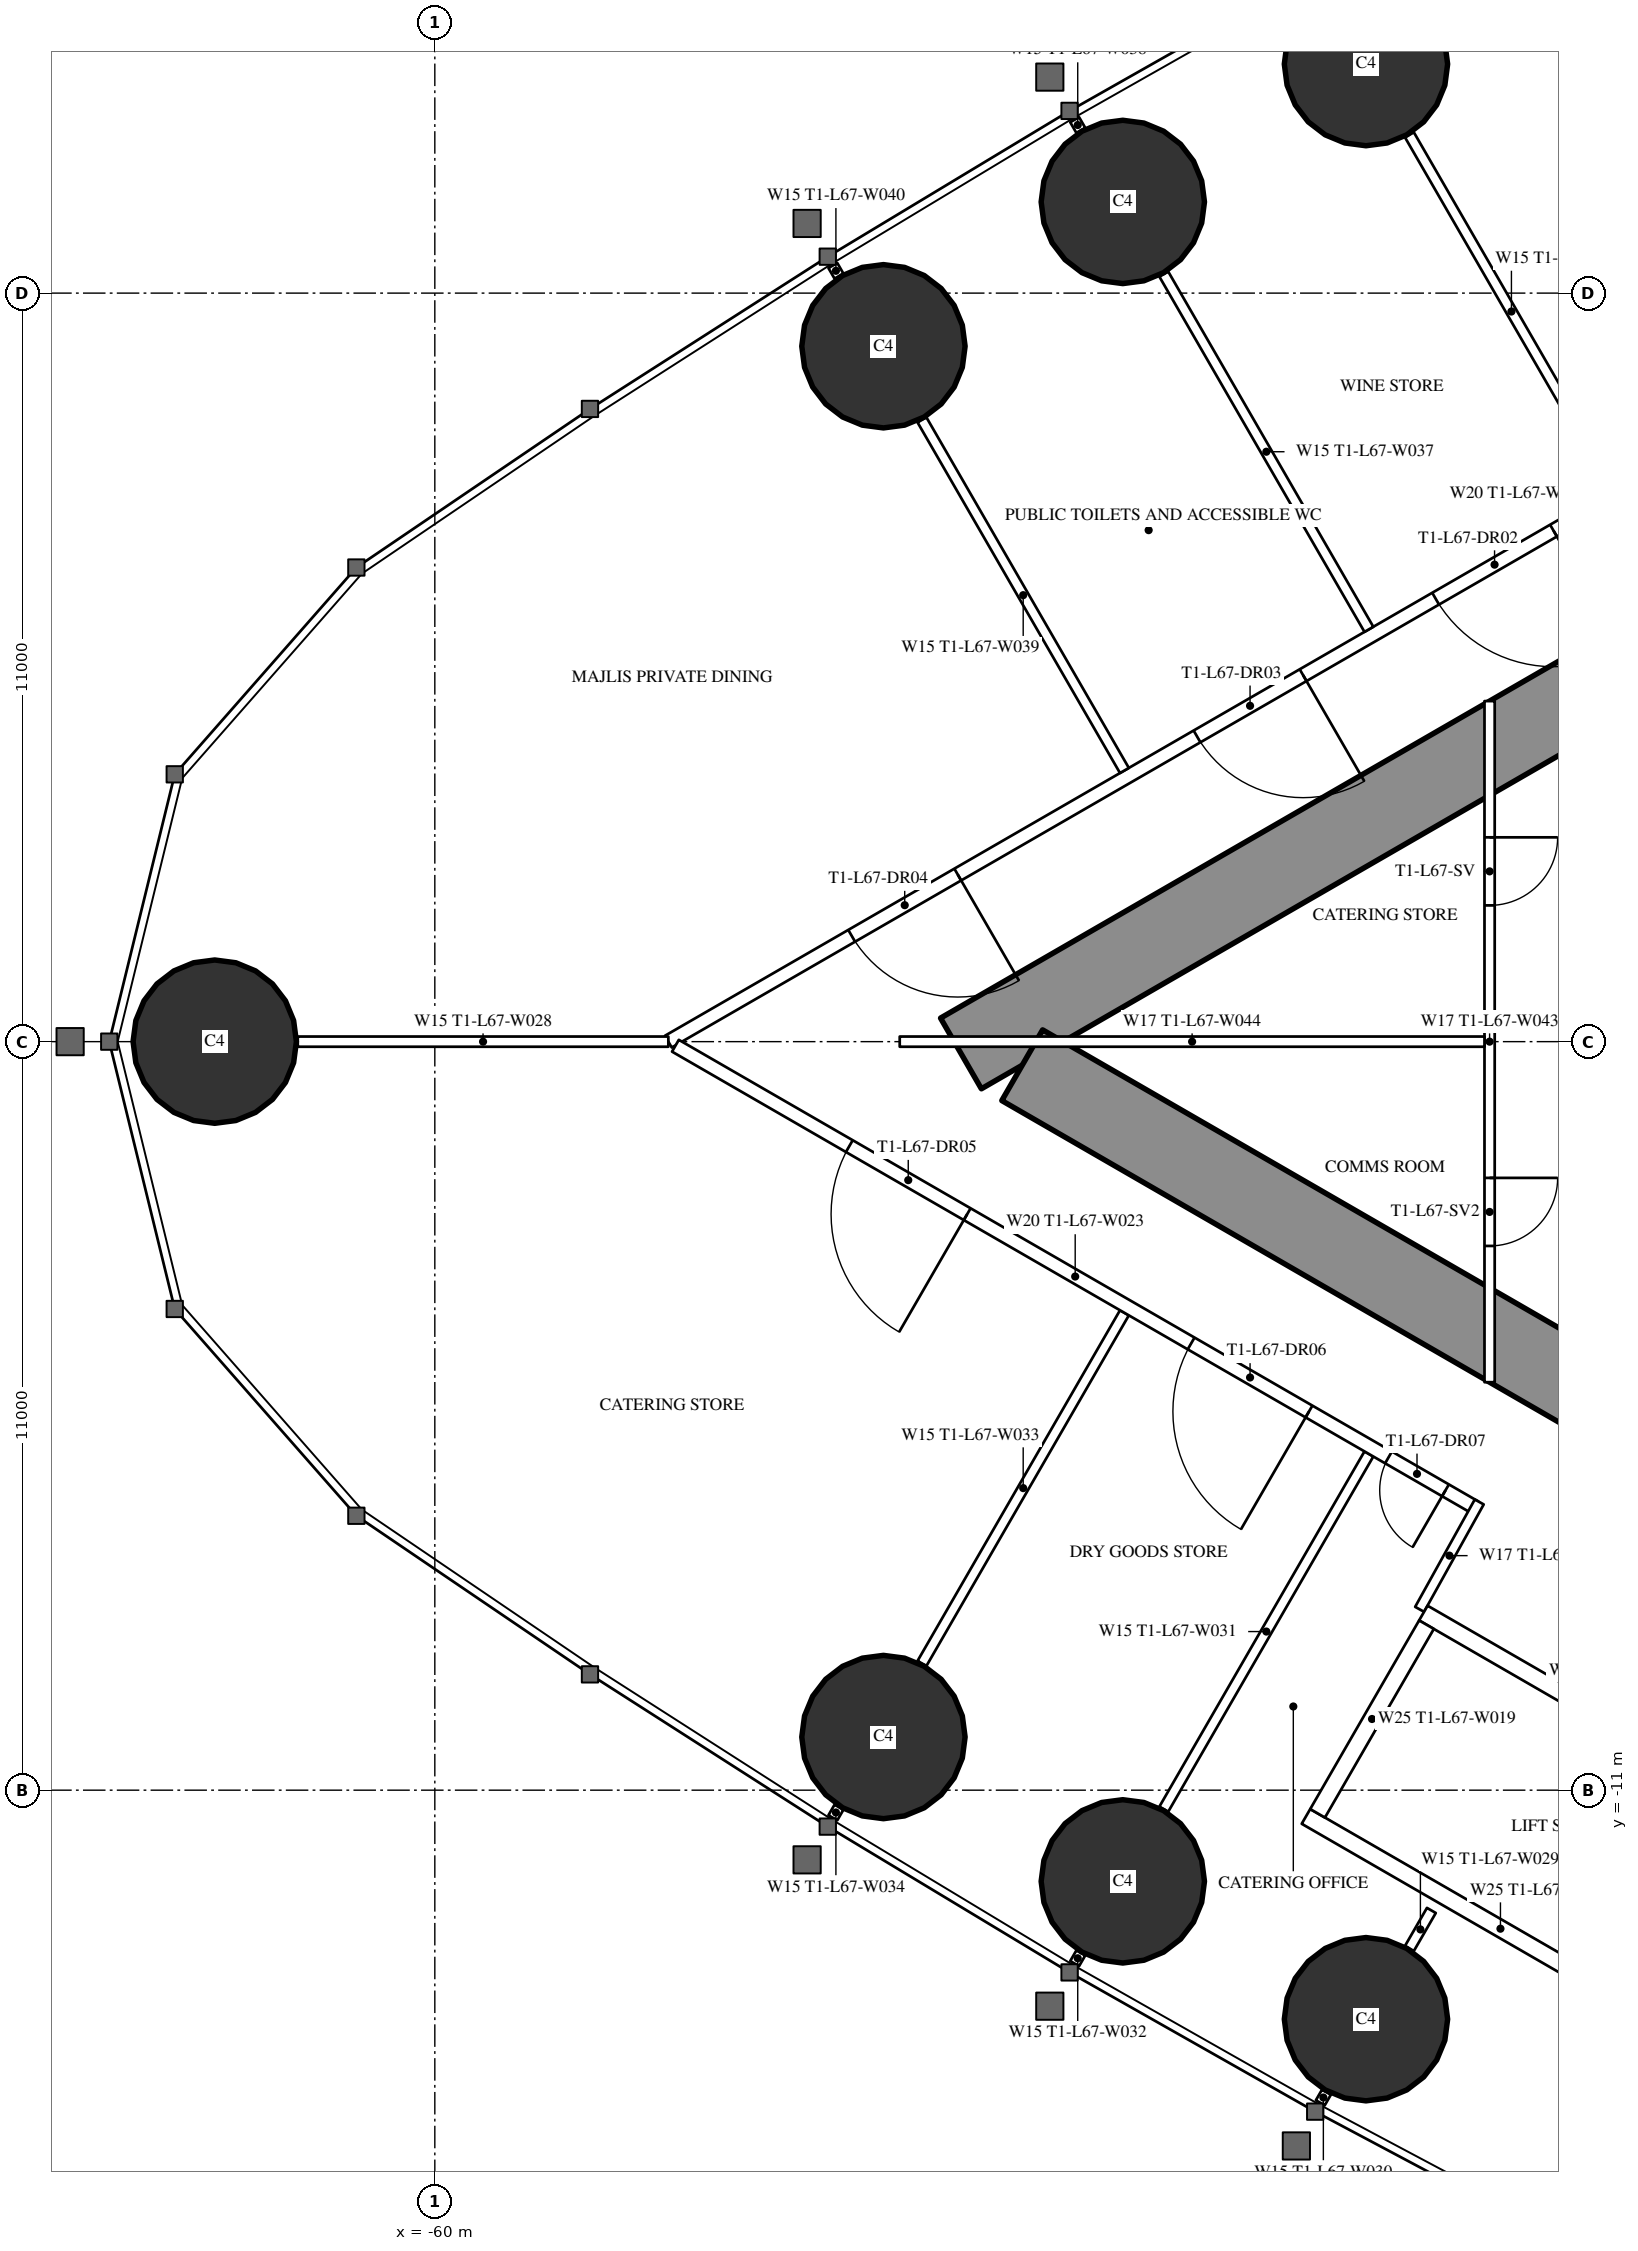
"""IFC4 building model, lengths in metres.
Left out: names, types, materials, properties, quantities, classifications, styles, units other than length and angle.
Written with IfcOpenShell. Run it as: python <this file> out.ifc"""

import sys

from ifc_helpers import new_model, si_unit, direction, frame, frame_2d, origin, origin_2d, place, context, subcontext, project, spatial, rectangle, circle, extrude, element, fill, save


model = new_model("IFC4")
c1 = context("Model", 3, precision=1e-05, world=origin(), true_north=direction((0.0, 1.0)))
c2 = subcontext(c1, "Body", "Model", "MODEL_VIEW")
j1 = project(units=[si_unit("LENGTHUNIT", "METRE"), si_unit("PLANEANGLEUNIT", "RADIAN")], contexts=[c1])
p1 = place(None, origin())
s1 = spatial("IfcSite", under=j1, at=p1, CompositionType="ELEMENT")
p2 = place(p1, origin())
s2 = spatial("IfcBuilding", under=s1, at=p2, CompositionType="ELEMENT")
p3 = place(p2, frame((0.0, 0.0, 251.9)))
s3 = spatial("IfcBuildingStorey", under=s2, at=p3, CompositionType="ELEMENT", Elevation=251.9)
for number, where, z_axis, x_axis in (
    (1, (-63.234, 0.0, 0.0), (0.0, 0.0, 1.0), (1.0, 0.0, 0.0)),
    (2, (-53.408, -10.219, 0.0), (0.0, 0.0, 1.0), (1.0, 0.0, 0.0)),
    (3, (-49.89, -12.34, 0.0), (0.0, 0.0, 1.0), (1.0, 0.0, 0.0)),
    (4, (-46.317, -14.365, 0.0), (0.0, 0.0, 1.0), (1.0, 0.0, 0.0)),
    (5, (-46.317, 14.365, 0.0), (0.0, 0.0, 1.0), (1.0, 0.0, 0.0)),
    (6, (-49.89, 12.34, 0.0), (0.0, 0.0, 1.0), (1.0, 0.0, 0.0)),
    (7, (-53.408, 10.219, 0.0), (0.0, 0.0, 1.0), (1.0, 0.0, 0.0)),
):
    element("IfcColumn", number, at=place(p3, frame(where, z_axis=z_axis, x_axis=x_axis)), inside=s3, PredefinedType="COLUMN", context=c2, shape_type="SweptSolid", body=[
        extrude(circle(Radius=1.2, at=origin_2d()), origin(), (0.0, 0.0, 1.0), 5.4),
    ])
p4 = place(p3, frame((-27.2, 14.3, 0.0), z_axis=(0.0, 0.0, 1.0), x_axis=(-0.866026593062, -0.499997940104, 0.0)))
e8 = element("IfcWall", 8, at=p4, inside=s3, PredefinedType="SHEAR", context=c2, shape_type="SweptSolid", body=[
    extrude(rectangle(XDim=28.946, YDim=1.2, at=frame_2d((14.473, 0.0))), origin(), (0.0, 0.0, 1.0), 5.4),
])
p5 = place(p4, frame((4.6, 0.0, 0.0)))
e9 = element("IfcOpeningElement", 9, at=p5, cuts=e8, PredefinedType="OPENING", context=c2, shape_type="SweptSolid", body=[
    extrude(rectangle(XDim=1.0, YDim=2.2, at=frame_2d((0.5, 1.1))), frame((0.0, 0.61, 0.0), z_axis=(0.0, -1.0, 0.0), x_axis=(1.0, 0.0, 0.0)), (0.0, 0.0, 1.0), 1.22),
])
p6 = place(p4, frame((13.395, 0.0, 0.0)))
e10 = element("IfcOpeningElement", 10, at=p6, cuts=e8, PredefinedType="OPENING", context=c2, shape_type="SweptSolid", body=[
    extrude(rectangle(XDim=1.8, YDim=2.2, at=frame_2d((0.9, 1.1))), frame((0.0, 0.61, 0.0), z_axis=(0.0, -1.0, 0.0), x_axis=(1.0, 0.0, 0.0)), (0.0, 0.0, 1.0), 1.22),
])
p7 = place(p3, frame((-27.2, -14.3, 0.0), z_axis=(0.0, 0.0, 1.0), x_axis=(-0.866024021859, 0.500002393557, 0.0)))
e11 = element("IfcWall", 11, at=p7, inside=s3, PredefinedType="SHEAR", context=c2, shape_type="SweptSolid", body=[
    extrude(rectangle(XDim=27.907, YDim=1.2, at=frame_2d((13.954, 0.0))), origin(), (0.0, 0.0, 1.0), 5.4),
])
p8 = place(p7, frame((4.6, 0.0, 0.0)))
e12 = element("IfcOpeningElement", 12, at=p8, cuts=e11, PredefinedType="OPENING", context=c2, shape_type="SweptSolid", body=[
    extrude(rectangle(XDim=1.0, YDim=2.2, at=frame_2d((0.5, 1.1))), frame((0.0, 0.61, 0.0), z_axis=(0.0, -1.0, 0.0), x_axis=(1.0, 0.0, 0.0)), (0.0, 0.0, 1.0), 1.22),
])
p9 = place(p7, frame((13.395, 0.0, 0.0)))
e13 = element("IfcOpeningElement", 13, at=p9, cuts=e11, PredefinedType="OPENING", context=c2, shape_type="SweptSolid", body=[
    extrude(rectangle(XDim=1.8, YDim=2.2, at=frame_2d((0.9, 1.1))), frame((0.0, 0.61, 0.0), z_axis=(0.0, -1.0, 0.0), x_axis=(1.0, 0.0, 0.0)), (0.0, 0.0, 1.0), 1.22),
])
p10 = place(p3, frame((-28.681, 16.101, 0.0), z_axis=(0.0, 0.0, 1.0), x_axis=(-0.866024860443, -0.500000941094, 0.0)))
e14 = element("IfcWall", 14, at=p10, inside=s3, PredefinedType="PARTITIONING", context=c2, shape_type="SweptSolid", body=[
    extrude(rectangle(XDim=32.201, YDim=0.2, at=frame_2d((16.101, 0.0))), origin(), (0.0, 0.0, 1.0), 5.15),
])
p11 = place(p10, frame((7.266, 0.0, 0.0)))
e15 = element("IfcOpeningElement", 15, at=p11, cuts=e14, PredefinedType="OPENING", context=c2, shape_type="SweptSolid", body=[
    extrude(rectangle(XDim=1.8, YDim=2.2, at=frame_2d((0.9, 1.1))), frame((0.0, 0.11, 0.0), z_axis=(0.0, -1.0, 0.0), x_axis=(1.0, 0.0, 0.0)), (0.0, 0.0, 1.0), 0.22),
])
p12 = place(p10, frame((17.182, 0.0, 0.0)))
e16 = element("IfcOpeningElement", 16, at=p12, cuts=e14, PredefinedType="OPENING", context=c2, shape_type="SweptSolid", body=[
    extrude(rectangle(XDim=2.0, YDim=2.4, at=frame_2d((1.0, 1.2))), frame((0.0, 0.11, 0.0), z_axis=(0.0, -1.0, 0.0), x_axis=(1.0, 0.0, 0.0)), (0.0, 0.0, 1.0), 0.22),
])
p13 = place(p10, frame((21.43, 0.0, 0.0)))
e17 = element("IfcOpeningElement", 17, at=p13, cuts=e14, PredefinedType="OPENING", context=c2, shape_type="SweptSolid", body=[
    extrude(rectangle(XDim=1.8, YDim=2.2, at=frame_2d((0.9, 1.1))), frame((0.0, 0.11, 0.0), z_axis=(0.0, -1.0, 0.0), x_axis=(1.0, 0.0, 0.0)), (0.0, 0.0, 1.0), 0.22),
])
p14 = place(p10, frame((27.29, 0.0, 0.0)))
e18 = element("IfcOpeningElement", 18, at=p14, cuts=e14, PredefinedType="OPENING", context=c2, shape_type="SweptSolid", body=[
    extrude(rectangle(XDim=1.8, YDim=2.2, at=frame_2d((0.9, 1.1))), frame((0.0, 0.11, 0.0), z_axis=(0.0, -1.0, 0.0), x_axis=(1.0, 0.0, 0.0)), (0.0, 0.0, 1.0), 0.22),
])
p15 = place(p3, frame((-42.68, 8.134, 0.0), z_axis=(0.0, 0.0, 1.0), x_axis=(-0.499984479505, 0.866034364361, 0.0)))
e19 = element("IfcWall", 19, at=p15, inside=s3, PredefinedType="PARTITIONING", context=c2, shape_type="SweptSolid", body=[
    extrude(rectangle(XDim=5.995, YDim=0.15, at=frame_2d((2.998, 0.0))), origin(), (0.0, 0.0, 1.0), 4.25),
])
p16 = place(p3, frame((-46.274, 6.059, 0.0), z_axis=(0.0, 0.0, 1.0), x_axis=(-0.500020471368, 0.866013584312, 0.0)))
e20 = element("IfcWall", 20, at=p16, inside=s3, PredefinedType="PARTITIONING", context=c2, shape_type="SweptSolid", body=[
    extrude(rectangle(XDim=6.028, YDim=0.15, at=frame_2d((3.014, 0.0))), origin(), (0.0, 0.0, 1.0), 4.25),
])
p17 = place(p3, frame((-50.508, 13.392, 0.0), z_axis=(0.0, 0.0, 1.0), x_axis=(-0.499644091975, 0.866230789891, 0.0)))
e21 = element("IfcWall", 21, at=p17, inside=s3, PredefinedType="PARTITIONING", context=c2, shape_type="SweptSolid", body=[
    extrude(rectangle(XDim=0.18, YDim=0.15, at=frame_2d((0.09, 0.0))), origin(), (0.0, 0.0, 1.0), 4.25),
])
p18 = place(p3, frame((-49.866, 3.985, 0.0), z_axis=(0.0, 0.0, 1.0), x_axis=(-0.500000694566, 0.866025002776, 0.0)))
e22 = element("IfcWall", 22, at=p18, inside=s3, PredefinedType="PARTITIONING", context=c2, shape_type="SweptSolid", body=[
    extrude(rectangle(XDim=5.95, YDim=0.15, at=frame_2d((2.975, 0.0))), origin(), (0.0, 0.0, 1.0), 4.25),
])
p19 = place(p3, frame((-54.061, 11.25, 0.0), z_axis=(0.0, 0.0, 1.0), x_axis=(-0.500391173478, 0.865799441849, 0.0)))
e23 = element("IfcWall", 23, at=p19, inside=s3, PredefinedType="PARTITIONING", context=c2, shape_type="SweptSolid", body=[
    extrude(rectangle(XDim=0.179, YDim=0.15, at=frame_2d((0.089, 0.0))), origin(), (0.0, 0.0, 1.0), 4.25),
])
p20 = place(p3, frame((-46.898, -15.439, 0.0), z_axis=(0.0, 0.0, 1.0), x_axis=(-0.500232303069, -0.865891241997, 0.0)))
e24 = element("IfcWall", 24, at=p20, inside=s3, PredefinedType="PARTITIONING", context=c2, shape_type="SweptSolid", body=[
    extrude(rectangle(XDim=0.18, YDim=0.15, at=frame_2d((0.09, 0.0))), origin(), (0.0, 0.0, 1.0), 4.25),
])
p21 = place(p3, frame((-46.274, -6.059, 0.0), z_axis=(0.0, 0.0, 1.0), x_axis=(-0.500020471368, -0.866013584312, 0.0)))
e25 = element("IfcWall", 25, at=p21, inside=s3, PredefinedType="PARTITIONING", context=c2, shape_type="SweptSolid", body=[
    extrude(rectangle(XDim=6.028, YDim=0.15, at=frame_2d((3.014, 0.0))), origin(), (0.0, 0.0, 1.0), 4.25),
])
p22 = place(p3, frame((-50.508, -13.392, 0.0), z_axis=(0.0, 0.0, 1.0), x_axis=(-0.499644091975, -0.866230789891, 0.0)))
e26 = element("IfcWall", 26, at=p22, inside=s3, PredefinedType="PARTITIONING", context=c2, shape_type="SweptSolid", body=[
    extrude(rectangle(XDim=0.18, YDim=0.15, at=frame_2d((0.09, 0.0))), origin(), (0.0, 0.0, 1.0), 4.25),
])
p23 = place(p3, frame((-49.866, -3.985, 0.0), z_axis=(0.0, 0.0, 1.0), x_axis=(-0.500000694566, -0.866025002776, 0.0)))
e27 = element("IfcWall", 27, at=p23, inside=s3, PredefinedType="PARTITIONING", context=c2, shape_type="SweptSolid", body=[
    extrude(rectangle(XDim=5.95, YDim=0.15, at=frame_2d((2.975, 0.0))), origin(), (0.0, 0.0, 1.0), 4.25),
])
p24 = place(p3, frame((-54.061, -11.25, 0.0), z_axis=(0.0, 0.0, 1.0), x_axis=(-0.500391173478, -0.865799441849, 0.0)))
e28 = element("IfcWall", 28, at=p24, inside=s3, PredefinedType="PARTITIONING", context=c2, shape_type="SweptSolid", body=[
    extrude(rectangle(XDim=0.179, YDim=0.15, at=frame_2d((0.089, 0.0))), origin(), (0.0, 0.0, 1.0), 4.25),
])
p25 = place(p3, frame((-56.568, 0.0, 0.0), z_axis=(0.0, 0.0, 1.0), x_axis=(-1.0, 0.0, 0.0)))
e29 = element("IfcWall", 29, at=p25, inside=s3, PredefinedType="PARTITIONING", context=c2, shape_type="SweptSolid", body=[
    extrude(rectangle(XDim=5.446, YDim=0.15, at=frame_2d((2.723, 0.0))), origin(), (0.0, 0.0, 1.0), 4.25),
])
p26 = place(p3, frame((-45.356, -12.767, 0.0), z_axis=(0.0, 0.0, 1.0), x_axis=(-0.499886366516, -0.866091000168, 0.0)))
e30 = element("IfcWall", 30, at=p26, inside=s3, PredefinedType="PARTITIONING", context=c2, shape_type="SweptSolid", body=[
    extrude(rectangle(XDim=0.645, YDim=0.15, at=frame_2d((0.322, 0.0))), origin(), (0.0, 0.0, 1.0), 5.15),
])
p27 = place(p3, frame((-44.715, -6.844, 0.0), z_axis=(0.0, 0.0, 1.0), x_axis=(-0.866025261224, 0.500000246922, 0.0)))
e31 = element("IfcWall", 31, at=p27, inside=s3, PredefinedType="PARTITIONING", context=c2, shape_type="SweptSolid", body=[
    extrude(rectangle(XDim=13.567, YDim=0.2, at=frame_2d((6.783, 0.0))), origin(), (0.0, 0.0, 1.0), 5.15),
])
p28 = place(p27, frame((8.616, 0.0, 0.0)))
e32 = element("IfcOpeningElement", 32, at=p28, cuts=e31, PredefinedType="OPENING", context=c2, shape_type="SweptSolid", body=[
    extrude(rectangle(XDim=2.0, YDim=2.4, at=frame_2d((1.0, 1.2))), frame((0.0, 0.11, 0.0), z_axis=(0.0, -1.0, 0.0), x_axis=(1.0, 0.0, 0.0)), (0.0, 0.0, 1.0), 0.22),
])
p29 = place(p27, frame((2.816, 0.0, 0.0)))
e33 = element("IfcOpeningElement", 33, at=p29, cuts=e31, PredefinedType="OPENING", context=c2, shape_type="SweptSolid", body=[
    extrude(rectangle(XDim=2.0, YDim=2.4, at=frame_2d((1.0, 1.2))), frame((0.0, 0.11, 0.0), z_axis=(0.0, -1.0, 0.0), x_axis=(1.0, 0.0, 0.0)), (0.0, 0.0, 1.0), 0.22),
])
p30 = place(p27, frame((0.5, 0.0, 0.0)))
e34 = element("IfcOpeningElement", 34, at=p30, cuts=e31, PredefinedType="OPENING", context=c2, shape_type="SweptSolid", body=[
    extrude(rectangle(XDim=0.967, YDim=2.2, at=frame_2d((0.483, 1.1))), frame((0.0, 0.11, 0.0), z_axis=(0.0, -1.0, 0.0), x_axis=(1.0, 0.0, 0.0)), (0.0, 0.0, 1.0), 0.22),
])
p31 = place(p3, frame((-44.652, -6.764, 0.0), z_axis=(0.0, 0.0, 1.0), x_axis=(-0.485528096672, -0.8742210632, 0.0)))
e35 = element("IfcWall", 35, at=p31, inside=s3, PredefinedType="PARTITIONING", context=c2, shape_type="SweptSolid", body=[
    extrude(rectangle(XDim=1.805, YDim=0.15, at=frame_2d((0.903, 0.0))), origin(), (0.0, 0.0, 1.0), 5.15),
])
p32 = place(p3, frame((-44.5, 5.005, 0.0), z_axis=(0.0, 0.0, 1.0), x_axis=(0.0, -1.0, 0.0)))
e36 = element("IfcWall", 36, at=p32, inside=s3, PredefinedType="PARTITIONING", context=c2, shape_type="SweptSolid", body=[
    extrude(rectangle(XDim=10.009, YDim=0.15, at=frame_2d((5.005, 0.0))), origin(), (0.0, 0.0, 1.0), 4.3),
])
p33 = place(p32, frame((2.002, 0.0, 0.0)))
e37 = element("IfcOpeningElement", 37, at=p33, cuts=e36, PredefinedType="OPENING", context=c2, shape_type="SweptSolid", body=[
    extrude(rectangle(XDim=1.0, YDim=2.2, at=frame_2d((0.5, 1.1))), frame((0.0, 0.085, 0.0), z_axis=(0.0, -1.0, 0.0), x_axis=(1.0, 0.0, 0.0)), (0.0, 0.0, 1.0), 0.17),
])
p34 = place(p32, frame((7.007, 0.0, 0.0)))
e38 = element("IfcOpeningElement", 38, at=p34, cuts=e36, PredefinedType="OPENING", context=c2, shape_type="SweptSolid", body=[
    extrude(rectangle(XDim=1.0, YDim=2.2, at=frame_2d((0.5, 1.1))), frame((0.0, 0.085, 0.0), z_axis=(0.0, -1.0, 0.0), x_axis=(1.0, 0.0, 0.0)), (0.0, 0.0, 1.0), 0.17),
])
p35 = place(p3, frame((-44.575, 0.0, 0.0), z_axis=(0.0, 0.0, 1.0), x_axis=(-1.0, 0.0, 0.0)))
e39 = element("IfcWall", 39, at=p35, inside=s3, PredefinedType="PARTITIONING", context=c2, shape_type="SweptSolid", body=[
    extrude(rectangle(XDim=8.593, YDim=0.15, at=frame_2d((4.297, 0.0))), origin(), (0.0, 0.0, 1.0), 4.25),
])
p36 = place(p3, frame((-39.758, -11.697, 0.0), z_axis=(0.0, 0.0, 1.0), x_axis=(-0.866024194504, 0.500002094529, 0.0)))
e40 = element("IfcWall", 40, at=p36, inside=s3, PredefinedType="PARTITIONING", context=c2, shape_type="SweptSolid", body=[
    extrude(rectangle(XDim=6.6, YDim=0.25, at=frame_2d((3.3, 0.0))), origin(), (0.0, 0.0, 1.0), 5.15),
])
p37 = place(p3, frame((-41.482, -14.686, 0.0), z_axis=(0.0, 0.0, 1.0), x_axis=(-0.86603344179, 0.499986077507, 0.0)))
e41 = element("IfcWall", 41, at=p37, inside=s3, PredefinedType="PARTITIONING", context=c2, shape_type="SweptSolid", body=[
    extrude(rectangle(XDim=6.6, YDim=0.25, at=frame_2d((3.3, 0.0))), origin(), (0.0, 0.0, 1.0), 5.15),
])
p38 = place(p3, frame((-45.428, -8.568, 0.0), z_axis=(0.0, 0.0, 1.0), x_axis=(-0.499929347863, -0.866066190972, 0.0)))
e42 = element("IfcWall", 42, at=p38, inside=s3, PredefinedType="PARTITIONING", context=c2, shape_type="SweptSolid", body=[
    extrude(rectangle(XDim=3.201, YDim=0.25, at=frame_2d((1.6, 0.0))), origin(), (0.0, 0.0, 1.0), 5.15),
])
p39 = place(p12, origin())
e43 = element("IfcDoor", 43, at=p39, inside=s3, OperationType="DOUBLE_DOOR_SINGLE_SWING", PredefinedType="DOOR", context=c2, shape_type="SweptSolid", body=[
    extrude(rectangle(XDim=2.0, YDim=2.4, at=frame_2d((1.0, 1.2))), frame((0.0, 0.025, 0.0), z_axis=(0.0, -1.0, 0.0), x_axis=(1.0, 0.0, 0.0)), (0.0, 0.0, 1.0), 0.05),
])
fill(e16, e43)
p40 = place(p13, origin())
e44 = element("IfcDoor", 44, at=p40, inside=s3, OperationType="DOUBLE_DOOR_SINGLE_SWING", PredefinedType="DOOR", context=c2, shape_type="SweptSolid", body=[
    extrude(rectangle(XDim=1.8, YDim=2.2, at=frame_2d((0.9, 1.1))), frame((0.0, 0.025, 0.0), z_axis=(0.0, -1.0, 0.0), x_axis=(1.0, 0.0, 0.0)), (0.0, 0.0, 1.0), 0.05),
])
fill(e17, e44)
p41 = place(p14, origin())
e45 = element("IfcDoor", 45, at=p41, inside=s3, OperationType="DOUBLE_DOOR_SINGLE_SWING", PredefinedType="DOOR", context=c2, shape_type="SweptSolid", body=[
    extrude(rectangle(XDim=1.8, YDim=2.2, at=frame_2d((0.9, 1.1))), frame((0.0, 0.025, 0.0), z_axis=(0.0, -1.0, 0.0), x_axis=(1.0, 0.0, 0.0)), (0.0, 0.0, 1.0), 0.05),
])
fill(e18, e45)
p42 = place(p28, origin())
e46 = element("IfcDoor", 46, at=p42, inside=s3, OperationType="DOUBLE_DOOR_SINGLE_SWING", PredefinedType="DOOR", context=c2, shape_type="SweptSolid", body=[
    extrude(rectangle(XDim=2.0, YDim=2.4, at=frame_2d((1.0, 1.2))), frame((0.0, 0.025, 0.0), z_axis=(0.0, -1.0, 0.0), x_axis=(1.0, 0.0, 0.0)), (0.0, 0.0, 1.0), 0.05),
])
fill(e32, e46)
p43 = place(p29, origin())
e47 = element("IfcDoor", 47, at=p43, inside=s3, OperationType="DOUBLE_DOOR_SINGLE_SWING", PredefinedType="DOOR", context=c2, shape_type="SweptSolid", body=[
    extrude(rectangle(XDim=2.0, YDim=2.4, at=frame_2d((1.0, 1.2))), frame((0.0, 0.025, 0.0), z_axis=(0.0, -1.0, 0.0), x_axis=(1.0, 0.0, 0.0)), (0.0, 0.0, 1.0), 0.05),
])
fill(e33, e47)
p44 = place(p30, origin())
e48 = element("IfcDoor", 48, at=p44, inside=s3, OperationType="SINGLE_SWING_LEFT", PredefinedType="DOOR", context=c2, shape_type="SweptSolid", body=[
    extrude(rectangle(XDim=0.967, YDim=2.2, at=frame_2d((0.483, 1.1))), frame((0.0, 0.025, 0.0), z_axis=(0.0, -1.0, 0.0), x_axis=(1.0, 0.0, 0.0)), (0.0, 0.0, 1.0), 0.05),
])
fill(e34, e48)
p45 = place(p33, origin())
e49 = element("IfcDoor", 49, at=p45, inside=s3, OperationType="SINGLE_SWING_LEFT", PredefinedType="DOOR", context=c2, shape_type="SweptSolid", body=[
    extrude(rectangle(XDim=1.0, YDim=2.2, at=frame_2d((0.5, 1.1))), frame((0.0, 0.025, 0.0), z_axis=(0.0, -1.0, 0.0), x_axis=(1.0, 0.0, 0.0)), (0.0, 0.0, 1.0), 0.05),
])
fill(e37, e49)
p46 = place(p34, origin())
e50 = element("IfcDoor", 50, at=p46, inside=s3, OperationType="SINGLE_SWING_LEFT", PredefinedType="DOOR", context=c2, shape_type="SweptSolid", body=[
    extrude(rectangle(XDim=1.0, YDim=2.2, at=frame_2d((0.5, 1.1))), frame((0.0, 0.025, 0.0), z_axis=(0.0, -1.0, 0.0), x_axis=(1.0, 0.0, 0.0)), (0.0, 0.0, 1.0), 0.05),
])
fill(e38, e50)
save(model, sys.argv[1])
